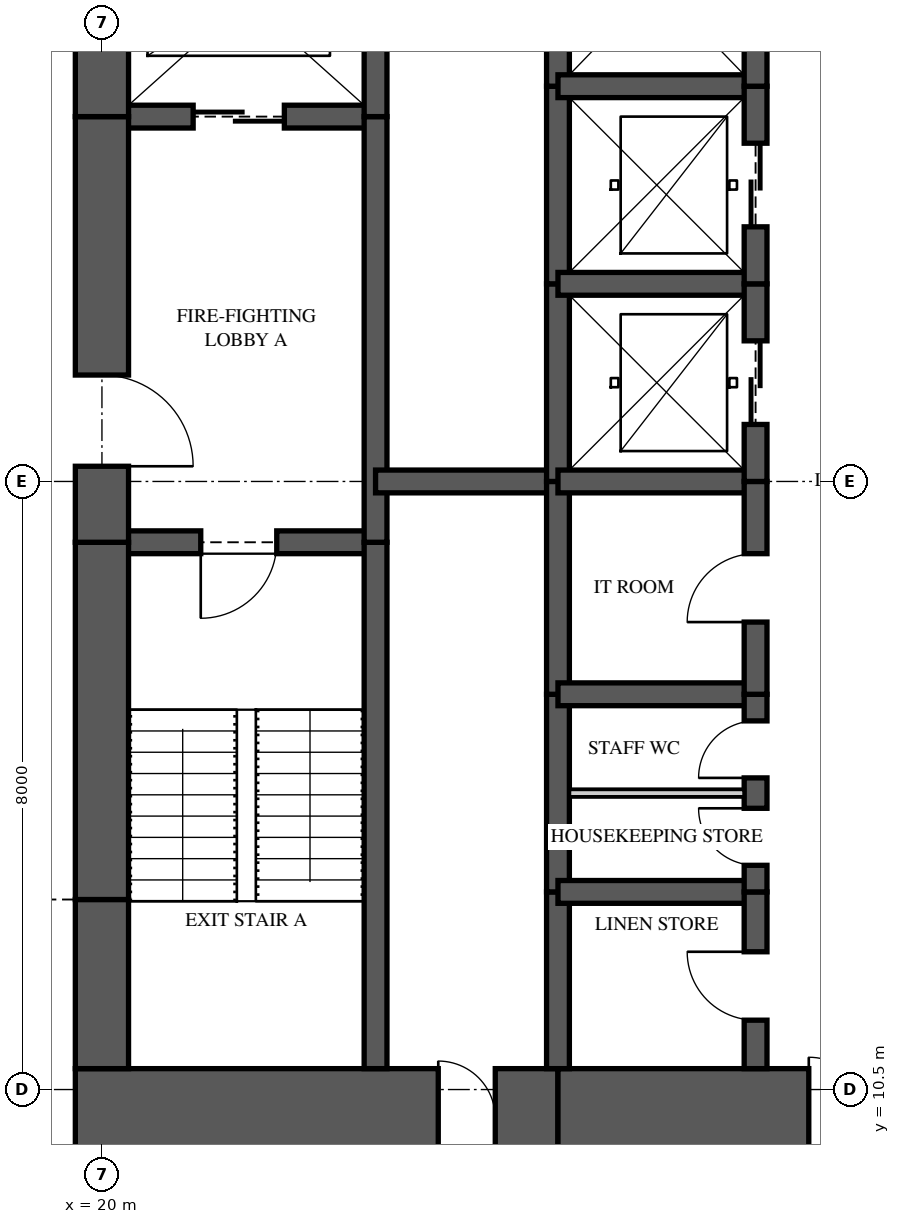
"""IFC4 building model, lengths in metres.
Left out: names, types, materials, properties, quantities, classifications, styles, units other than length and angle.
Written with IfcOpenShell. Run it as: python <this file> out.ifc"""

import sys

from ifc_helpers import new_model, si_unit, direction, frame, frame_2d, origin, place, context, subcontext, project, spatial, rectangle, extrude, element, fill, save


model = new_model("IFC4")
c1 = context("Model", 3, precision=1e-05, world=origin(), true_north=direction((0.0, 1.0)))
c2 = subcontext(c1, "Body", "Model", "MODEL_VIEW")
j1 = project(units=[si_unit("LENGTHUNIT", "METRE"), si_unit("PLANEANGLEUNIT", "RADIAN")], contexts=[c1])
p1 = place(None, origin())
s1 = spatial("IfcSite", under=j1, at=p1, CompositionType="ELEMENT")
p2 = place(p1, origin())
s2 = spatial("IfcBuilding", under=s1, at=p2, CompositionType="ELEMENT")
p3 = place(p2, frame((0.0, 0.0, 197.9)))
s3 = spatial("IfcBuildingStorey", under=s2, at=p3, CompositionType="ELEMENT", Elevation=197.9)
p4 = place(p3, frame((19.65, 10.125, 0.0), z_axis=(0.0, 0.0, 1.0), x_axis=(1.0, 0.0, 0.0)))
e1 = element("IfcWall", 1, at=p4, inside=s3, PredefinedType="SHEAR", context=c2, shape_type="SweptSolid", body=[
    extrude(rectangle(XDim=6.35, YDim=1.3, at=frame_2d((3.175, 0.0))), origin(), (0.0, 0.0, 1.0), 3.35),
])
p5 = place(p4, frame((4.775, 0.0, 0.0)))
e2 = element("IfcOpeningElement", 2, at=p5, cuts=e1, PredefinedType="OPENING", context=c2, shape_type="SweptSolid", body=[
    extrude(rectangle(XDim=0.75, YDim=2.1, at=frame_2d((0.375, 1.05))), frame((0.0, 0.66, 0.0), z_axis=(0.0, -1.0, 0.0), x_axis=(1.0, 0.0, 0.0)), (0.0, 0.0, 1.0), 1.32),
])
p6 = place(p3, frame((26.0, 10.125, 0.0), z_axis=(0.0, 0.0, 1.0), x_axis=(1.0, 0.0, 0.0)))
e3 = element("IfcWall", 3, at=p6, inside=s3, PredefinedType="SHEAR", context=c2, shape_type="SweptSolid", body=[
    extrude(rectangle(XDim=5.6, YDim=1.3, at=frame_2d((2.8, 0.0))), origin(), (0.0, 0.0, 1.0), 3.35),
])
p7 = place(p6, frame((3.3, 0.0, 0.0)))
e4 = element("IfcOpeningElement", 4, at=p7, cuts=e3, PredefinedType="OPENING", context=c2, shape_type="SweptSolid", body=[
    extrude(rectangle(XDim=1.6, YDim=2.1, at=frame_2d((0.8, 1.05))), frame((0.0, 0.66, 0.0), z_axis=(0.0, -1.0, 0.0), x_axis=(1.0, 0.0, 0.0)), (0.0, 0.0, 1.0), 1.32),
])
p8 = place(p3, frame((20.0, 26.225, 0.0), z_axis=(0.0, 0.0, 1.0), x_axis=(0.0, -1.0, 0.0)))
e5 = element("IfcWall", 5, at=p8, inside=s3, PredefinedType="SHEAR", context=c2, shape_type="SweptSolid", body=[
    extrude(rectangle(XDim=2.925, YDim=0.7, at=frame_2d((1.462, 0.0))), origin(), (0.0, 0.0, 1.0), 3.35),
])
p9 = place(p3, frame((20.0, 23.3, 0.0), z_axis=(0.0, 0.0, 1.0), x_axis=(0.0, -1.0, 0.0)))
e6 = element("IfcWall", 6, at=p9, inside=s3, PredefinedType="SHEAR", context=c2, shape_type="SweptSolid", body=[
    extrude(rectangle(XDim=5.6, YDim=0.7, at=frame_2d((2.8, 0.0))), origin(), (0.0, 0.0, 1.0), 3.35),
])
p10 = place(p9, frame((3.4, 0.0, 0.0)))
e7 = element("IfcOpeningElement", 7, at=p10, cuts=e6, PredefinedType="OPENING", context=c2, shape_type="SweptSolid", body=[
    extrude(rectangle(XDim=1.2, YDim=2.2, at=frame_2d((0.6, 1.1))), frame((0.0, 0.36, 0.0), z_axis=(0.0, -1.0, 0.0), x_axis=(1.0, 0.0, 0.0)), (0.0, 0.0, 1.0), 0.72),
])
p11 = place(p3, frame((20.0, 17.7, 0.0), z_axis=(0.0, 0.0, 1.0), x_axis=(0.0, -1.0, 0.0)))
e8 = element("IfcWall", 8, at=p11, inside=s3, PredefinedType="SHEAR", context=c2, shape_type="SweptSolid", body=[
    extrude(rectangle(XDim=4.7, YDim=0.7, at=frame_2d((2.35, 0.0))), origin(), (0.0, 0.0, 1.0), 3.35),
])
p12 = place(p3, frame((20.0, 13.0, 0.0), z_axis=(0.0, 0.0, 1.0), x_axis=(0.0, -1.0, 0.0)))
e9 = element("IfcWall", 9, at=p12, inside=s3, PredefinedType="SHEAR", context=c2, shape_type="SweptSolid", body=[
    extrude(rectangle(XDim=2.225, YDim=0.7, at=frame_2d((1.113, 0.0))), origin(), (0.0, 0.0, 1.0), 3.35),
])
p13 = place(p3, frame((23.6, 10.775, 0.0), z_axis=(0.0, 0.0, 1.0), x_axis=(0.0, 1.0, 0.0)))
e10 = element("IfcWall", 10, at=p13, inside=s3, PredefinedType="SHEAR", context=c2, shape_type="SweptSolid", body=[
    extrude(rectangle(XDim=6.925, YDim=0.3, at=frame_2d((3.462, 0.0))), origin(), (0.0, 0.0, 1.0), 3.35),
])
p14 = place(p3, frame((23.6, 17.7, 0.0), z_axis=(0.0, 0.0, 1.0), x_axis=(0.0, 1.0, 0.0)))
e11 = element("IfcWall", 11, at=p14, inside=s3, PredefinedType="SHEAR", context=c2, shape_type="SweptSolid", body=[
    extrude(rectangle(XDim=5.6, YDim=0.3, at=frame_2d((2.8, 0.0))), origin(), (0.0, 0.0, 1.0), 3.35),
])
p15 = place(p3, frame((23.6, 23.3, 0.0), z_axis=(0.0, 0.0, 1.0), x_axis=(0.0, 1.0, 0.0)))
e12 = element("IfcWall", 12, at=p15, inside=s3, PredefinedType="SHEAR", context=c2, shape_type="SweptSolid", body=[
    extrude(rectangle(XDim=2.925, YDim=0.3, at=frame_2d((1.462, 0.0))), origin(), (0.0, 0.0, 1.0), 3.35),
])
p16 = place(p3, frame((26.0, 10.775, 0.0), z_axis=(0.0, 0.0, 1.0), x_axis=(0.0, 1.0, 0.0)))
e13 = element("IfcWall", 13, at=p16, inside=s3, PredefinedType="SHEAR", context=c2, shape_type="SweptSolid", body=[
    extrude(rectangle(XDim=2.325, YDim=0.3, at=frame_2d((1.163, 0.0))), origin(), (0.0, 0.0, 1.0), 3.35),
])
p17 = place(p3, frame((26.0, 13.1, 0.0), z_axis=(0.0, 0.0, 1.0), x_axis=(0.0, 1.0, 0.0)))
e14 = element("IfcWall", 14, at=p17, inside=s3, PredefinedType="SHEAR", context=c2, shape_type="SweptSolid", body=[
    extrude(rectangle(XDim=2.6, YDim=0.3, at=frame_2d((1.3, 0.0))), origin(), (0.0, 0.0, 1.0), 3.35),
])
p18 = place(p3, frame((26.0, 15.7, 0.0), z_axis=(0.0, 0.0, 1.0), x_axis=(0.0, 1.0, 0.0)))
e15 = element("IfcWall", 15, at=p18, inside=s3, PredefinedType="SHEAR", context=c2, shape_type="SweptSolid", body=[
    extrude(rectangle(XDim=2.8, YDim=0.3, at=frame_2d((1.4, 0.0))), origin(), (0.0, 0.0, 1.0), 3.35),
])
p19 = place(p3, frame((26.0, 18.5, 0.0), z_axis=(0.0, 0.0, 1.0), x_axis=(0.0, 1.0, 0.0)))
e16 = element("IfcWall", 16, at=p19, inside=s3, PredefinedType="SHEAR", context=c2, shape_type="SweptSolid", body=[
    extrude(rectangle(XDim=2.6, YDim=0.3, at=frame_2d((1.3, 0.0))), origin(), (0.0, 0.0, 1.0), 3.35),
])
p20 = place(p3, frame((26.0, 21.1, 0.0), z_axis=(0.0, 0.0, 1.0), x_axis=(0.0, 1.0, 0.0)))
e17 = element("IfcWall", 17, at=p20, inside=s3, PredefinedType="SHEAR", context=c2, shape_type="SweptSolid", body=[
    extrude(rectangle(XDim=2.6, YDim=0.3, at=frame_2d((1.3, 0.0))), origin(), (0.0, 0.0, 1.0), 3.35),
])
p21 = place(p3, frame((26.0, 23.7, 0.0), z_axis=(0.0, 0.0, 1.0), x_axis=(0.0, 1.0, 0.0)))
e18 = element("IfcWall", 18, at=p21, inside=s3, PredefinedType="SHEAR", context=c2, shape_type="SweptSolid", body=[
    extrude(rectangle(XDim=2.525, YDim=0.3, at=frame_2d((1.263, 0.0))), origin(), (0.0, 0.0, 1.0), 3.35),
])
p22 = place(p3, frame((28.6, 10.775, 0.0), z_axis=(0.0, 0.0, 1.0), x_axis=(0.0, 1.0, 0.0)))
e19 = element("IfcWall", 19, at=p22, inside=s3, PredefinedType="SHEAR", context=c2, shape_type="SweptSolid", body=[
    extrude(rectangle(XDim=2.325, YDim=0.3, at=frame_2d((1.163, 0.0))), origin(), (0.0, 0.0, 1.0), 3.35),
])
p23 = place(p22, frame((0.637, 0.0, 0.0)))
e20 = element("IfcOpeningElement", 20, at=p23, cuts=e19, PredefinedType="OPENING", context=c2, shape_type="SweptSolid", body=[
    extrude(rectangle(XDim=0.9, YDim=2.1, at=frame_2d((0.45, 1.05))), frame((0.0, 0.16, 0.0), z_axis=(0.0, -1.0, 0.0), x_axis=(1.0, 0.0, 0.0)), (0.0, 0.0, 1.0), 0.32),
])
p24 = place(p3, frame((28.6, 13.1, 0.0), z_axis=(0.0, 0.0, 1.0), x_axis=(0.0, 1.0, 0.0)))
e21 = element("IfcWall", 21, at=p24, inside=s3, PredefinedType="SHEAR", context=c2, shape_type="SweptSolid", body=[
    extrude(rectangle(XDim=2.6, YDim=0.3, at=frame_2d((1.3, 0.0))), origin(), (0.0, 0.0, 1.0), 3.35),
])
p25 = place(p24, frame((0.35, 0.0, 0.0)))
e22 = element("IfcOpeningElement", 22, at=p25, cuts=e21, PredefinedType="OPENING", context=c2, shape_type="SweptSolid", body=[
    extrude(rectangle(XDim=0.75, YDim=2.1, at=frame_2d((0.375, 1.05))), frame((0.0, 0.16, 0.0), z_axis=(0.0, -1.0, 0.0), x_axis=(1.0, 0.0, 0.0)), (0.0, 0.0, 1.0), 0.32),
])
p26 = place(p24, frame((1.5, 0.0, 0.0)))
e23 = element("IfcOpeningElement", 23, at=p26, cuts=e21, PredefinedType="OPENING", context=c2, shape_type="SweptSolid", body=[
    extrude(rectangle(XDim=0.75, YDim=2.1, at=frame_2d((0.375, 1.05))), frame((0.0, 0.16, 0.0), z_axis=(0.0, -1.0, 0.0), x_axis=(1.0, 0.0, 0.0)), (0.0, 0.0, 1.0), 0.32),
])
p27 = place(p3, frame((28.6, 15.7, 0.0), z_axis=(0.0, 0.0, 1.0), x_axis=(0.0, 1.0, 0.0)))
e24 = element("IfcWall", 24, at=p27, inside=s3, PredefinedType="SHEAR", context=c2, shape_type="SweptSolid", body=[
    extrude(rectangle(XDim=2.8, YDim=0.3, at=frame_2d((1.4, 0.0))), origin(), (0.0, 0.0, 1.0), 3.35),
])
p28 = place(p27, frame((0.95, 0.0, 0.0)))
e25 = element("IfcOpeningElement", 25, at=p28, cuts=e24, PredefinedType="OPENING", context=c2, shape_type="SweptSolid", body=[
    extrude(rectangle(XDim=0.9, YDim=2.1, at=frame_2d((0.45, 1.05))), frame((0.0, 0.16, 0.0), z_axis=(0.0, -1.0, 0.0), x_axis=(1.0, 0.0, 0.0)), (0.0, 0.0, 1.0), 0.32),
])
p29 = place(p3, frame((28.6, 18.5, 0.0), z_axis=(0.0, 0.0, 1.0), x_axis=(0.0, 1.0, 0.0)))
e26 = element("IfcWall", 26, at=p29, inside=s3, PredefinedType="SHEAR", context=c2, shape_type="SweptSolid", body=[
    extrude(rectangle(XDim=2.6, YDim=0.3, at=frame_2d((1.3, 0.0))), origin(), (0.0, 0.0, 1.0), 3.35),
])
p30 = place(p29, frame((0.75, 0.0, 0.0)))
e27 = element("IfcOpeningElement", 27, at=p30, cuts=e26, PredefinedType="OPENING", context=c2, shape_type="SweptSolid", body=[
    extrude(rectangle(XDim=1.1, YDim=2.1, at=frame_2d((0.55, 1.05))), frame((0.0, 0.16, 0.0), z_axis=(0.0, -1.0, 0.0), x_axis=(1.0, 0.0, 0.0)), (0.0, 0.0, 1.0), 0.32),
])
p31 = place(p3, frame((28.6, 21.1, 0.0), z_axis=(0.0, 0.0, 1.0), x_axis=(0.0, 1.0, 0.0)))
e28 = element("IfcWall", 28, at=p31, inside=s3, PredefinedType="SHEAR", context=c2, shape_type="SweptSolid", body=[
    extrude(rectangle(XDim=2.6, YDim=0.3, at=frame_2d((1.3, 0.0))), origin(), (0.0, 0.0, 1.0), 3.35),
])
p32 = place(p31, frame((0.75, 0.0, 0.0)))
e29 = element("IfcOpeningElement", 29, at=p32, cuts=e28, PredefinedType="OPENING", context=c2, shape_type="SweptSolid", body=[
    extrude(rectangle(XDim=1.1, YDim=2.1, at=frame_2d((0.55, 1.05))), frame((0.0, 0.16, 0.0), z_axis=(0.0, -1.0, 0.0), x_axis=(1.0, 0.0, 0.0)), (0.0, 0.0, 1.0), 0.32),
])
p33 = place(p3, frame((28.6, 23.7, 0.0), z_axis=(0.0, 0.0, 1.0), x_axis=(0.0, 1.0, 0.0)))
e30 = element("IfcWall", 30, at=p33, inside=s3, PredefinedType="SHEAR", context=c2, shape_type="SweptSolid", body=[
    extrude(rectangle(XDim=2.525, YDim=0.3, at=frame_2d((1.263, 0.0))), origin(), (0.0, 0.0, 1.0), 3.35),
])
p34 = place(p33, frame((0.85, 0.0, 0.0)))
e31 = element("IfcOpeningElement", 31, at=p34, cuts=e30, PredefinedType="OPENING", context=c2, shape_type="SweptSolid", body=[
    extrude(rectangle(XDim=1.1, YDim=2.1, at=frame_2d((0.55, 1.05))), frame((0.0, 0.16, 0.0), z_axis=(0.0, -1.0, 0.0), x_axis=(1.0, 0.0, 0.0)), (0.0, 0.0, 1.0), 0.32),
])
p35 = place(p3, frame((20.0, 17.7, 0.0), z_axis=(0.0, 0.0, 1.0), x_axis=(1.0, 0.0, 0.0)))
e32 = element("IfcWall", 32, at=p35, inside=s3, PredefinedType="SHEAR", context=c2, shape_type="SweptSolid", body=[
    extrude(rectangle(XDim=3.6, YDim=0.3, at=frame_2d((1.8, 0.0))), origin(), (0.0, 0.0, 1.0), 3.35),
])
p36 = place(p35, frame((1.3, 0.0, 0.0)))
e33 = element("IfcOpeningElement", 33, at=p36, cuts=e32, PredefinedType="OPENING", context=c2, shape_type="SweptSolid", body=[
    extrude(rectangle(XDim=1.0, YDim=2.1, at=frame_2d((0.5, 1.05))), frame((0.0, 0.16, 0.0), z_axis=(0.0, -1.0, 0.0), x_axis=(1.0, 0.0, 0.0)), (0.0, 0.0, 1.0), 0.32),
])
p37 = place(p3, frame((20.0, 23.3, 0.0), z_axis=(0.0, 0.0, 1.0), x_axis=(1.0, 0.0, 0.0)))
e34 = element("IfcWall", 34, at=p37, inside=s3, PredefinedType="SHEAR", context=c2, shape_type="SweptSolid", body=[
    extrude(rectangle(XDim=3.6, YDim=0.3, at=frame_2d((1.8, 0.0))), origin(), (0.0, 0.0, 1.0), 3.35),
])
p38 = place(p37, frame((1.2, 0.0, 0.0)))
e35 = element("IfcOpeningElement", 35, at=p38, cuts=e34, PredefinedType="OPENING", context=c2, shape_type="SweptSolid", body=[
    extrude(rectangle(XDim=1.2, YDim=2.1, at=frame_2d((0.6, 1.05))), frame((0.0, 0.16, 0.0), z_axis=(0.0, -1.0, 0.0), x_axis=(1.0, 0.0, 0.0)), (0.0, 0.0, 1.0), 0.32),
])
p39 = place(p3, frame((23.6, 18.5, 0.0), z_axis=(0.0, 0.0, 1.0), x_axis=(1.0, 0.0, 0.0)))
e36 = element("IfcWall", 36, at=p39, inside=s3, PredefinedType="SHEAR", context=c2, shape_type="SweptSolid", body=[
    extrude(rectangle(XDim=2.4, YDim=0.3, at=frame_2d((1.2, 0.0))), origin(), (0.0, 0.0, 1.0), 3.35),
])
for number, where, z_axis, x_axis in (
    (37, (26.0, 13.1, 0.0), (0.0, 0.0, 1.0), (1.0, 0.0, 0.0)),
    (38, (26.0, 15.7, 0.0), (0.0, 0.0, 1.0), (1.0, 0.0, 0.0)),
    (39, (26.0, 18.5, 0.0), (0.0, 0.0, 1.0), (1.0, 0.0, 0.0)),
    (40, (26.0, 21.1, 0.0), (0.0, 0.0, 1.0), (1.0, 0.0, 0.0)),
    (41, (26.0, 23.7, 0.0), (0.0, 0.0, 1.0), (1.0, 0.0, 0.0)),
):
    element("IfcWall", number, at=place(p3, frame(where, z_axis=z_axis, x_axis=x_axis)), inside=s3, PredefinedType="SHEAR", context=c2, shape_type="SweptSolid", body=[
        extrude(rectangle(XDim=2.6, YDim=0.3, at=frame_2d((1.3, 0.0))), origin(), (0.0, 0.0, 1.0), 3.35),
    ])
p40 = place(p3, frame((26.15, 14.4, 0.0), z_axis=(0.0, 0.0, 1.0), x_axis=(1.0, 0.0, 0.0)))
e42 = element("IfcWall", 42, at=p40, inside=s3, PredefinedType="PARTITIONING", context=c2, shape_type="SweptSolid", body=[
    extrude(rectangle(XDim=2.3, YDim=0.1, at=frame_2d((1.15, 0.0))), origin(), (0.0, 0.0, 1.0), 3.11),
])
p41 = place(p36, frame((1.0, 0.0, 0.0), z_axis=(0.0, 0.0, 1.0), x_axis=(-1.0, 0.0, 0.0)))
e43 = element("IfcDoor", 43, at=p41, inside=s3, OperationType="SINGLE_SWING_RIGHT", PredefinedType="DOOR", context=c2, shape_type="SweptSolid", body=[
    extrude(rectangle(XDim=1.0, YDim=2.1, at=frame_2d((0.5, 1.05))), frame((0.0, 0.025, 0.0), z_axis=(0.0, -1.0, 0.0), x_axis=(1.0, 0.0, 0.0)), (0.0, 0.0, 1.0), 0.05),
])
fill(e33, e43)
p42 = place(p10, origin())
e44 = element("IfcDoor", 44, at=p42, inside=s3, OperationType="SINGLE_SWING_RIGHT", PredefinedType="DOOR", context=c2, shape_type="SweptSolid", body=[
    extrude(rectangle(XDim=1.2, YDim=2.2, at=frame_2d((0.6, 1.1))), frame((0.0, 0.025, 0.0), z_axis=(0.0, -1.0, 0.0), x_axis=(1.0, 0.0, 0.0)), (0.0, 0.0, 1.0), 0.05),
])
fill(e7, e44)
p43 = place(p38, origin())
e45 = element("IfcDoor", 45, at=p43, inside=s3, OperationType="SLIDING_TO_LEFT", PredefinedType="DOOR", context=c2, shape_type="SweptSolid", body=[
    extrude(rectangle(XDim=1.2, YDim=2.1, at=frame_2d((0.6, 1.05))), frame((0.0, 0.025, 0.0), z_axis=(0.0, -1.0, 0.0), x_axis=(1.0, 0.0, 0.0)), (0.0, 0.0, 1.0), 0.05),
])
fill(e35, e45)
p44 = place(p30, origin())
e46 = element("IfcDoor", 46, at=p44, inside=s3, OperationType="SLIDING_TO_LEFT", PredefinedType="DOOR", context=c2, shape_type="SweptSolid", body=[
    extrude(rectangle(XDim=1.1, YDim=2.1, at=frame_2d((0.55, 1.05))), frame((0.0, 0.025, 0.0), z_axis=(0.0, -1.0, 0.0), x_axis=(1.0, 0.0, 0.0)), (0.0, 0.0, 1.0), 0.05),
])
fill(e27, e46)
p45 = place(p32, origin())
e47 = element("IfcDoor", 47, at=p45, inside=s3, OperationType="SLIDING_TO_LEFT", PredefinedType="DOOR", context=c2, shape_type="SweptSolid", body=[
    extrude(rectangle(XDim=1.1, YDim=2.1, at=frame_2d((0.55, 1.05))), frame((0.0, 0.025, 0.0), z_axis=(0.0, -1.0, 0.0), x_axis=(1.0, 0.0, 0.0)), (0.0, 0.0, 1.0), 0.05),
])
fill(e29, e47)
p46 = place(p23, origin())
e48 = element("IfcDoor", 48, at=p46, inside=s3, OperationType="SINGLE_SWING_RIGHT", PredefinedType="DOOR", context=c2, shape_type="SweptSolid", body=[
    extrude(rectangle(XDim=0.9, YDim=2.1, at=frame_2d((0.45, 1.05))), frame((0.0, 0.025, 0.0), z_axis=(0.0, -1.0, 0.0), x_axis=(1.0, 0.0, 0.0)), (0.0, 0.0, 1.0), 0.05),
])
fill(e20, e48)
p47 = place(p25, origin())
e49 = element("IfcDoor", 49, at=p47, inside=s3, OperationType="SINGLE_SWING_RIGHT", PredefinedType="DOOR", context=c2, shape_type="SweptSolid", body=[
    extrude(rectangle(XDim=0.75, YDim=2.1, at=frame_2d((0.375, 1.05))), frame((0.0, 0.025, 0.0), z_axis=(0.0, -1.0, 0.0), x_axis=(1.0, 0.0, 0.0)), (0.0, 0.0, 1.0), 0.05),
])
fill(e22, e49)
p48 = place(p26, origin())
e50 = element("IfcDoor", 50, at=p48, inside=s3, OperationType="SINGLE_SWING_LEFT", PredefinedType="DOOR", context=c2, shape_type="SweptSolid", body=[
    extrude(rectangle(XDim=0.75, YDim=2.1, at=frame_2d((0.375, 1.05))), frame((0.0, 0.025, 0.0), z_axis=(0.0, -1.0, 0.0), x_axis=(1.0, 0.0, 0.0)), (0.0, 0.0, 1.0), 0.05),
])
fill(e23, e50)
p49 = place(p28, origin())
e51 = element("IfcDoor", 51, at=p49, inside=s3, OperationType="SINGLE_SWING_LEFT", PredefinedType="DOOR", context=c2, shape_type="SweptSolid", body=[
    extrude(rectangle(XDim=0.9, YDim=2.1, at=frame_2d((0.45, 1.05))), frame((0.0, 0.025, 0.0), z_axis=(0.0, -1.0, 0.0), x_axis=(1.0, 0.0, 0.0)), (0.0, 0.0, 1.0), 0.05),
])
fill(e25, e51)
p50 = place(p7, origin())
e52 = element("IfcDoor", 52, at=p50, inside=s3, OperationType="DOUBLE_DOOR_SINGLE_SWING", PredefinedType="DOOR", context=c2, shape_type="SweptSolid", body=[
    extrude(rectangle(XDim=1.6, YDim=2.1, at=frame_2d((0.8, 1.05))), frame((0.0, 0.025, 0.0), z_axis=(0.0, -1.0, 0.0), x_axis=(1.0, 0.0, 0.0)), (0.0, 0.0, 1.0), 0.05),
])
fill(e4, e52)
p51 = place(p5, origin())
e53 = element("IfcDoor", 53, at=p51, inside=s3, OperationType="SINGLE_SWING_LEFT", PredefinedType="DOOR", context=c2, shape_type="SweptSolid", body=[
    extrude(rectangle(XDim=0.75, YDim=2.1, at=frame_2d((0.375, 1.05))), frame((0.0, 0.025, 0.0), z_axis=(0.0, -1.0, 0.0), x_axis=(1.0, 0.0, 0.0)), (0.0, 0.0, 1.0), 0.05),
])
fill(e2, e53)
save(model, sys.argv[1])
